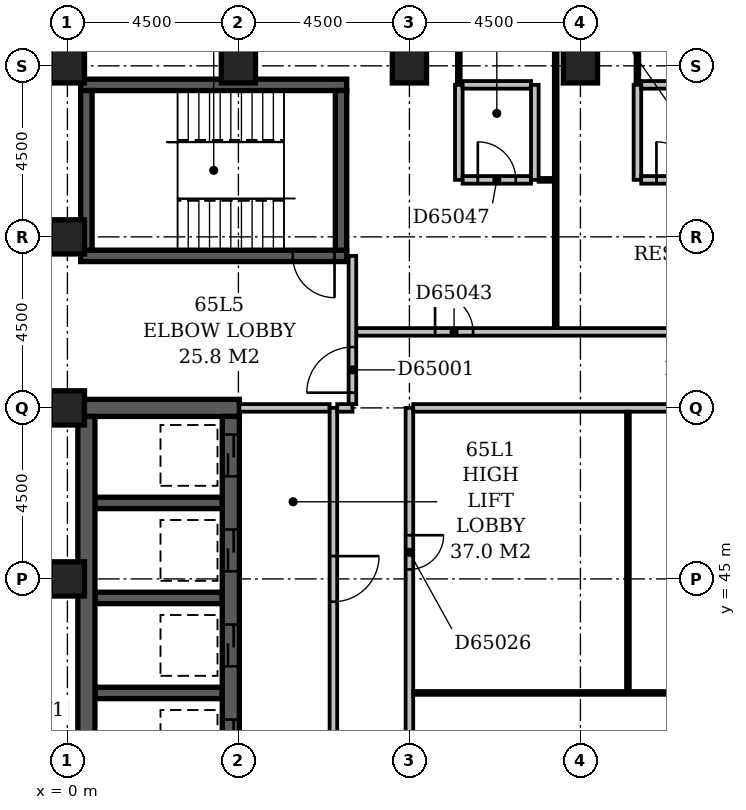
"""IFC4 building model, lengths in metres.
Left out: names, types, materials, properties, quantities, classifications, styles, units other than length and angle.
Written with IfcOpenShell. Run it as: python <this file> out.ifc"""

import sys

from ifc_helpers import new_model, si_unit, direction, frame, frame_2d, origin, origin_2d, place, context, subcontext, project, spatial, rectangle, extrude, element, fill, save


model = new_model("IFC4")
c1 = context("Model", 3, precision=1e-05, world=origin(), true_north=direction((0.0, 1.0)))
c2 = subcontext(c1, "Body", "Model", "MODEL_VIEW")
j1 = project(units=[si_unit("LENGTHUNIT", "METRE"), si_unit("PLANEANGLEUNIT", "RADIAN")], contexts=[c1])
p1 = place(None, origin())
s1 = spatial("IfcSite", under=j1, at=p1, CompositionType="ELEMENT")
p2 = place(p1, origin())
s2 = spatial("IfcBuilding", under=s1, at=p2, CompositionType="ELEMENT")
p3 = place(p2, frame((0.0, 0.0, 251.0)))
s3 = spatial("IfcBuildingStorey", under=s2, at=p3, CompositionType="ELEMENT", Elevation=251.0)
p4 = place(p3, frame((0.275, 49.5, -0.3), z_axis=(0.0, 0.0, 1.0), x_axis=(1.0, 0.0, 0.0)))
e1 = element("IfcWall", 1, at=p4, inside=s3, PredefinedType="SHEAR", context=c2, shape_type="SweptSolid", body=[
    extrude(rectangle(XDim=4.25, YDim=0.45, at=frame_2d((2.125, 0.0))), origin(), (0.0, 0.0, 1.0), 3.6),
])
p5 = place(p3, frame((0.35, 53.5, -0.3), z_axis=(0.0, 0.0, 1.0), x_axis=(1.0, 0.0, 0.0)))
e2 = element("IfcWall", 2, at=p5, inside=s3, PredefinedType="SHEAR", context=c2, shape_type="SweptSolid", body=[
    extrude(rectangle(XDim=7.0, YDim=0.3, at=frame_2d((3.5, 0.0))), origin(), (0.0, 0.0, 1.0), 3.6),
])
p6 = place(p5, frame((5.58, 0.0, 0.3)))
e3 = element("IfcOpeningElement", 3, at=p6, cuts=e2, PredefinedType="OPENING", context=c2, shape_type="SweptSolid", body=[
    extrude(rectangle(XDim=1.1, YDim=2.1, at=frame_2d((0.55, 1.05))), frame((0.0, 0.162, 0.0), z_axis=(0.0, -1.0, 0.0), x_axis=(1.0, 0.0, 0.0)), (0.0, 0.0, 1.0), 0.324),
])
p7 = place(p3, frame((0.35, 58.0, -0.3), z_axis=(0.0, 0.0, 1.0), x_axis=(1.0, 0.0, 0.0)))
e4 = element("IfcWall", 4, at=p7, inside=s3, PredefinedType="SHEAR", context=c2, shape_type="SweptSolid", body=[
    extrude(rectangle(XDim=7.0, YDim=0.3, at=frame_2d((3.5, 0.0))), origin(), (0.0, 0.0, 1.0), 3.6),
])
p8 = place(p3, frame((0.5, 27.15, -0.3), z_axis=(0.0, 0.0, 1.0), x_axis=(0.0, 1.0, 0.0)))
e5 = element("IfcWall", 5, at=p8, inside=s3, PredefinedType="SHEAR", context=c2, shape_type="SweptSolid", body=[
    extrude(rectangle(XDim=22.125, YDim=0.45, at=frame_2d((11.062, 0.0))), origin(), (0.0, 0.0, 1.0), 3.6),
])
p9 = place(p3, frame((0.5, 53.65, -0.3), z_axis=(0.0, 0.0, 1.0), x_axis=(0.0, 1.0, 0.0)))
e6 = element("IfcWall", 6, at=p9, inside=s3, PredefinedType="SHEAR", context=c2, shape_type="SweptSolid", body=[
    extrude(rectangle(XDim=4.2, YDim=0.3, at=frame_2d((2.1, 0.0))), origin(), (0.0, 0.0, 1.0), 3.6),
])
for number, where, z_axis, x_axis in (
    (7, (0.725, 42.0, -0.3), (0.0, 0.0, 1.0), (1.0, 0.0, 0.0)),
    (8, (0.725, 44.5, -0.3), (0.0, 0.0, 1.0), (1.0, 0.0, 0.0)),
    (9, (0.725, 47.0, -0.3), (0.0, 0.0, 1.0), (1.0, 0.0, 0.0)),
):
    element("IfcWall", number, at=place(p3, frame(where, z_axis=z_axis, x_axis=x_axis)), inside=s3, PredefinedType="SHEAR", context=c2, shape_type="SweptSolid", body=[
        extrude(rectangle(XDim=3.35, YDim=0.3, at=frame_2d((1.675, 0.0))), origin(), (0.0, 0.0, 1.0), 3.6),
    ])
p10 = place(p3, frame((4.3, 27.15, -0.3), z_axis=(0.0, 0.0, 1.0), x_axis=(0.0, 1.0, 0.0)))
e10 = element("IfcWall", 10, at=p10, inside=s3, PredefinedType="SHEAR", context=c2, shape_type="SweptSolid", body=[
    extrude(rectangle(XDim=22.125, YDim=0.45, at=frame_2d((11.062, 0.0))), origin(), (0.0, 0.0, 1.0), 3.6),
])
p11 = place(p10, frame((3.05, 0.0, 0.3)))
e11 = element("IfcOpeningElement", 11, at=p11, cuts=e10, PredefinedType="OPENING", context=c2, shape_type="SweptSolid", body=[
    extrude(rectangle(XDim=1.1, YDim=2.1, at=frame_2d((0.55, 1.05))), frame((0.0, 0.237, 0.0), z_axis=(0.0, -1.0, 0.0), x_axis=(1.0, 0.0, 0.0)), (0.0, 0.0, 1.0), 0.474),
])
p12 = place(p10, frame((0.55, 0.0, 0.3)))
e12 = element("IfcOpeningElement", 12, at=p12, cuts=e10, PredefinedType="OPENING", context=c2, shape_type="SweptSolid", body=[
    extrude(rectangle(XDim=1.1, YDim=2.1, at=frame_2d((0.55, 1.05))), frame((0.0, 0.237, 0.0), z_axis=(0.0, -1.0, 0.0), x_axis=(1.0, 0.0, 0.0)), (0.0, 0.0, 1.0), 0.474),
])
p13 = place(p10, frame((20.55, 0.0, 0.3)))
e13 = element("IfcOpeningElement", 13, at=p13, cuts=e10, PredefinedType="OPENING", context=c2, shape_type="SweptSolid", body=[
    extrude(rectangle(XDim=1.1, YDim=2.1, at=frame_2d((0.55, 1.05))), frame((0.0, 0.237, 0.0), z_axis=(0.0, -1.0, 0.0), x_axis=(1.0, 0.0, 0.0)), (0.0, 0.0, 1.0), 0.474),
])
p14 = place(p10, frame((18.05, 0.0, 0.3)))
e14 = element("IfcOpeningElement", 14, at=p14, cuts=e10, PredefinedType="OPENING", context=c2, shape_type="SweptSolid", body=[
    extrude(rectangle(XDim=1.1, YDim=2.1, at=frame_2d((0.55, 1.05))), frame((0.0, 0.237, 0.0), z_axis=(0.0, -1.0, 0.0), x_axis=(1.0, 0.0, 0.0)), (0.0, 0.0, 1.0), 0.474),
])
p15 = place(p10, frame((15.55, 0.0, 0.3)))
e15 = element("IfcOpeningElement", 15, at=p15, cuts=e10, PredefinedType="OPENING", context=c2, shape_type="SweptSolid", body=[
    extrude(rectangle(XDim=1.1, YDim=2.1, at=frame_2d((0.55, 1.05))), frame((0.0, 0.237, 0.0), z_axis=(0.0, -1.0, 0.0), x_axis=(1.0, 0.0, 0.0)), (0.0, 0.0, 1.0), 0.474),
])
p16 = place(p10, frame((13.05, 0.0, 0.3)))
e16 = element("IfcOpeningElement", 16, at=p16, cuts=e10, PredefinedType="OPENING", context=c2, shape_type="SweptSolid", body=[
    extrude(rectangle(XDim=1.1, YDim=2.1, at=frame_2d((0.55, 1.05))), frame((0.0, 0.237, 0.0), z_axis=(0.0, -1.0, 0.0), x_axis=(1.0, 0.0, 0.0)), (0.0, 0.0, 1.0), 0.474),
])
p17 = place(p10, frame((10.55, 0.0, 0.3)))
e17 = element("IfcOpeningElement", 17, at=p17, cuts=e10, PredefinedType="OPENING", context=c2, shape_type="SweptSolid", body=[
    extrude(rectangle(XDim=1.1, YDim=2.1, at=frame_2d((0.55, 1.05))), frame((0.0, 0.237, 0.0), z_axis=(0.0, -1.0, 0.0), x_axis=(1.0, 0.0, 0.0)), (0.0, 0.0, 1.0), 0.474),
])
p18 = place(p10, frame((8.05, 0.0, 0.3)))
e18 = element("IfcOpeningElement", 18, at=p18, cuts=e10, PredefinedType="OPENING", context=c2, shape_type="SweptSolid", body=[
    extrude(rectangle(XDim=1.1, YDim=2.1, at=frame_2d((0.55, 1.05))), frame((0.0, 0.237, 0.0), z_axis=(0.0, -1.0, 0.0), x_axis=(1.0, 0.0, 0.0)), (0.0, 0.0, 1.0), 0.474),
])
p19 = place(p10, frame((5.55, 0.0, 0.3)))
e19 = element("IfcOpeningElement", 19, at=p19, cuts=e10, PredefinedType="OPENING", context=c2, shape_type="SweptSolid", body=[
    extrude(rectangle(XDim=1.1, YDim=2.1, at=frame_2d((0.55, 1.05))), frame((0.0, 0.237, 0.0), z_axis=(0.0, -1.0, 0.0), x_axis=(1.0, 0.0, 0.0)), (0.0, 0.0, 1.0), 0.474),
])
p20 = place(p3, frame((7.2, 53.65, -0.3), z_axis=(0.0, 0.0, 1.0), x_axis=(0.0, 1.0, 0.0)))
e20 = element("IfcWall", 20, at=p20, inside=s3, PredefinedType="SHEAR", context=c2, shape_type="SweptSolid", body=[
    extrude(rectangle(XDim=4.2, YDim=0.3, at=frame_2d((2.1, 0.0))), origin(), (0.0, 0.0, 1.0), 3.6),
])
for number, where, z_axis, x_axis in (
    (21, (0.0, 45.0, -0.3), (0.0, 0.0, 1.0), (1.0, 0.0, 0.0)),
    (22, (0.0, 49.5, -0.3), (0.0, 0.0, 1.0), (1.0, 0.0, 0.0)),
    (23, (0.0, 54.0, -0.3), (0.0, 0.0, 1.0), (1.0, 0.0, 0.0)),
    (24, (0.0, 58.5, -0.3), (0.0, 0.0, 1.0), (1.0, 0.0, 0.0)),
    (25, (4.5, 58.5, -0.3), (0.0, 0.0, 1.0), (1.0, 0.0, 0.0)),
    (26, (9.0, 58.5, -0.3), (0.0, 0.0, 1.0), (1.0, 0.0, 0.0)),
    (27, (13.5, 58.5, -0.3), (0.0, 0.0, 1.0), (1.0, 0.0, 0.0)),
):
    element("IfcColumn", number, at=place(p3, frame(where, z_axis=z_axis, x_axis=x_axis)), inside=s3, PredefinedType="COLUMN", context=c2, shape_type="SweptSolid", body=[
        extrude(rectangle(XDim=0.9, YDim=0.9, at=origin_2d()), origin(), (0.0, 0.0, 1.0), 3.6),
    ])
p21 = place(p3, frame((7.0, 34.6, 0.0), z_axis=(0.0, 0.0, 1.0), x_axis=(0.0, 1.0, 0.0)))
e28 = element("IfcWall", 28, at=p21, inside=s3, PredefinedType="PARTITIONING", context=c2, shape_type="SweptSolid", body=[
    extrude(rectangle(XDim=14.9, YDim=0.2, at=frame_2d((7.45, 0.0))), origin(), (0.0, 0.0, 1.0), 3.3),
])
p22 = place(p21, frame((2.8, 0.0, 0.0)))
e29 = element("IfcOpeningElement", 29, at=p22, cuts=e28, PredefinedType="OPENING", context=c2, shape_type="SweptSolid", body=[
    extrude(rectangle(XDim=1.2, YDim=2.1, at=frame_2d((0.6, 1.05))), frame((0.0, 0.112, 0.0), z_axis=(0.0, -1.0, 0.0), x_axis=(1.0, 0.0, 0.0)), (0.0, 0.0, 1.0), 0.224),
])
p23 = place(p21, frame((9.8, 0.0, 0.0)))
e30 = element("IfcOpeningElement", 30, at=p23, cuts=e28, PredefinedType="OPENING", context=c2, shape_type="SweptSolid", body=[
    extrude(rectangle(XDim=1.2, YDim=2.1, at=frame_2d((0.6, 1.05))), frame((0.0, 0.112, 0.0), z_axis=(0.0, -1.0, 0.0), x_axis=(1.0, 0.0, 0.0)), (0.0, 0.0, 1.0), 0.224),
])
p24 = place(p3, frame((4.525, 49.5, 0.0), z_axis=(0.0, 0.0, 1.0), x_axis=(1.0, 0.0, 0.0)))
e31 = element("IfcWall", 31, at=p24, inside=s3, PredefinedType="PARTITIONING", context=c2, shape_type="SweptSolid", body=[
    extrude(rectangle(XDim=2.375, YDim=0.2, at=frame_2d((1.188, 0.0))), origin(), (0.0, 0.0, 1.0), 3.3),
])
p25 = place(p3, frame((7.1, 49.5, 0.0), z_axis=(0.0, 0.0, 1.0), x_axis=(1.0, 0.0, 0.0)))
e32 = element("IfcWall", 32, at=p25, inside=s3, PredefinedType="PARTITIONING", context=c2, shape_type="SweptSolid", body=[
    extrude(rectangle(XDim=0.4, YDim=0.2, at=frame_2d((0.2, 0.0))), origin(), (0.0, 0.0, 1.0), 3.3),
])
p26 = place(p3, frame((7.5, 49.6, 0.0), z_axis=(0.0, 0.0, 1.0), x_axis=(0.0, 1.0, 0.0)))
e33 = element("IfcWall", 33, at=p26, inside=s3, PredefinedType="PARTITIONING", context=c2, shape_type="SweptSolid", body=[
    extrude(rectangle(XDim=3.9, YDim=0.2, at=frame_2d((1.95, 0.0))), origin(), (0.0, 0.0, 1.0), 3.3),
])
p27 = place(p26, frame((0.3, 0.0, 0.0)))
e34 = element("IfcOpeningElement", 34, at=p27, cuts=e33, PredefinedType="OPENING", context=c2, shape_type="SweptSolid", body=[
    extrude(rectangle(XDim=1.2, YDim=2.1, at=frame_2d((0.6, 1.05))), frame((0.0, 0.112, 0.0), z_axis=(0.0, -1.0, 0.0), x_axis=(1.0, 0.0, 0.0)), (0.0, 0.0, 1.0), 0.224),
])
p28 = place(p3, frame((9.0, 38.0, 0.0), z_axis=(0.0, 0.0, 1.0), x_axis=(0.0, 1.0, 0.0)))
e35 = element("IfcWall", 35, at=p28, inside=s3, PredefinedType="PARTITIONING", context=c2, shape_type="SweptSolid", body=[
    extrude(rectangle(XDim=11.5, YDim=0.2, at=frame_2d((5.75, 0.0))), origin(), (0.0, 0.0, 1.0), 3.3),
])
p29 = place(p28, frame((1.5, 0.0, 0.0)))
e36 = element("IfcOpeningElement", 36, at=p29, cuts=e35, PredefinedType="OPENING", context=c2, shape_type="SweptSolid", body=[
    extrude(rectangle(XDim=0.9, YDim=2.1, at=frame_2d((0.45, 1.05))), frame((0.0, 0.112, 0.0), z_axis=(0.0, -1.0, 0.0), x_axis=(1.0, 0.0, 0.0)), (0.0, 0.0, 1.0), 0.224),
])
p30 = place(p28, frame((7.25, 0.0, 0.0)))
e37 = element("IfcOpeningElement", 37, at=p30, cuts=e35, PredefinedType="OPENING", context=c2, shape_type="SweptSolid", body=[
    extrude(rectangle(XDim=0.9, YDim=2.1, at=frame_2d((0.45, 1.05))), frame((0.0, 0.112, 0.0), z_axis=(0.0, -1.0, 0.0), x_axis=(1.0, 0.0, 0.0)), (0.0, 0.0, 1.0), 0.224),
])
p31 = place(p3, frame((9.1, 42.0, 0.0), z_axis=(0.0, 0.0, 1.0), x_axis=(1.0, 0.0, 0.0)))
e38 = element("IfcWall", 38, at=p31, inside=s3, PredefinedType="PARTITIONING", context=c2, shape_type="SweptSolid", body=[
    extrude(rectangle(XDim=11.3, YDim=0.1, at=frame_2d((5.65, 0.0))), origin(), (0.0, 0.0, 1.0), 3.3),
])
p32 = place(p3, frame((14.75, 42.05, 0.0), z_axis=(0.0, 0.0, 1.0), x_axis=(0.0, 1.0, 0.0)))
e39 = element("IfcWall", 39, at=p32, inside=s3, PredefinedType="PARTITIONING", context=c2, shape_type="SweptSolid", body=[
    extrude(rectangle(XDim=7.35, YDim=0.1, at=frame_2d((3.675, 0.0))), origin(), (0.0, 0.0, 1.0), 3.3),
])
p33 = place(p3, frame((9.1, 49.5, 0.0), z_axis=(0.0, 0.0, 1.0), x_axis=(1.0, 0.0, 0.0)))
e40 = element("IfcWall", 40, at=p33, inside=s3, PredefinedType="PARTITIONING", context=c2, shape_type="SweptSolid", body=[
    extrude(rectangle(XDim=11.3, YDim=0.2, at=frame_2d((5.65, 0.0))), origin(), (0.0, 0.0, 1.0), 3.3),
])
p34 = place(p33, frame((8.025, 0.0, 0.0)))
e41 = element("IfcOpeningElement", 41, at=p34, cuts=e40, PredefinedType="OPENING", context=c2, shape_type="SweptSolid", body=[
    extrude(rectangle(XDim=0.9, YDim=2.1, at=frame_2d((0.45, 1.05))), frame((0.0, 0.112, 0.0), z_axis=(0.0, -1.0, 0.0), x_axis=(1.0, 0.0, 0.0)), (0.0, 0.0, 1.0), 0.224),
])
p35 = place(p3, frame((7.6, 51.5, 0.0), z_axis=(0.0, 0.0, 1.0), x_axis=(1.0, 0.0, 0.0)))
e42 = element("IfcWall", 42, at=p35, inside=s3, PredefinedType="PARTITIONING", context=c2, shape_type="SweptSolid", body=[
    extrude(rectangle(XDim=15.3, YDim=0.2, at=frame_2d((7.65, 0.0))), origin(), (0.0, 0.0, 1.0), 3.3),
])
p36 = place(p35, frame((2.075, 0.0, 0.0)))
e43 = element("IfcOpeningElement", 43, at=p36, cuts=e42, PredefinedType="OPENING", context=c2, shape_type="SweptSolid", body=[
    extrude(rectangle(XDim=1.0, YDim=2.1, at=frame_2d((0.5, 1.05))), frame((0.0, 0.112, 0.0), z_axis=(0.0, -1.0, 0.0), x_axis=(1.0, 0.0, 0.0)), (0.0, 0.0, 1.0), 0.224),
])
p37 = place(p35, frame((9.875, 0.0, 0.0)))
e44 = element("IfcOpeningElement", 44, at=p37, cuts=e42, PredefinedType="OPENING", context=c2, shape_type="SweptSolid", body=[
    extrude(rectangle(XDim=0.9, YDim=2.1, at=frame_2d((0.45, 1.05))), frame((0.0, 0.112, 0.0), z_axis=(0.0, -1.0, 0.0), x_axis=(1.0, 0.0, 0.0)), (0.0, 0.0, 1.0), 0.224),
])
p38 = place(p3, frame((12.85, 51.6, 0.0), z_axis=(0.0, 0.0, 1.0), x_axis=(0.0, 1.0, 0.0)))
e45 = element("IfcWall", 45, at=p38, inside=s3, PredefinedType="PARTITIONING", context=c2, shape_type="SweptSolid", body=[
    extrude(rectangle(XDim=7.5, YDim=0.1, at=frame_2d((3.75, 0.0))), origin(), (0.0, 0.0, 1.0), 3.3),
])
p39 = place(p3, frame((10.3, 55.5, 0.0), z_axis=(0.0, 0.0, 1.0), x_axis=(0.0, 1.0, 0.0)))
e46 = element("IfcWall", 46, at=p39, inside=s3, PredefinedType="PARTITIONING", context=c2, shape_type="SweptSolid", body=[
    extrude(rectangle(XDim=2.5, YDim=0.2, at=frame_2d((1.25, 0.0))), origin(), (0.0, 0.0, 1.0), 3.3),
])
p40 = place(p3, frame((10.4, 55.5, 0.0), z_axis=(0.0, 0.0, 1.0), x_axis=(1.0, 0.0, 0.0)))
e47 = element("IfcWall", 47, at=p40, inside=s3, PredefinedType="PARTITIONING", context=c2, shape_type="SweptSolid", body=[
    extrude(rectangle(XDim=1.8, YDim=0.2, at=frame_2d((0.9, 0.0))), origin(), (0.0, 0.0, 1.0), 3.3),
])
p41 = place(p40, frame((0.4, 0.0, 0.0)))
e48 = element("IfcOpeningElement", 48, at=p41, cuts=e47, PredefinedType="OPENING", context=c2, shape_type="SweptSolid", body=[
    extrude(rectangle(XDim=1.0, YDim=2.1, at=frame_2d((0.5, 1.05))), frame((0.0, 0.112, 0.0), z_axis=(0.0, -1.0, 0.0), x_axis=(1.0, 0.0, 0.0)), (0.0, 0.0, 1.0), 0.224),
])
p42 = place(p3, frame((12.3, 55.5, 0.0), z_axis=(0.0, 0.0, 1.0), x_axis=(0.0, 1.0, 0.0)))
e49 = element("IfcWall", 49, at=p42, inside=s3, PredefinedType="PARTITIONING", context=c2, shape_type="SweptSolid", body=[
    extrude(rectangle(XDim=2.5, YDim=0.2, at=frame_2d((1.25, 0.0))), origin(), (0.0, 0.0, 1.0), 3.3),
])
p43 = place(p3, frame((12.4, 55.5, 0.0), z_axis=(0.0, 0.0, 1.0), x_axis=(1.0, 0.0, 0.0)))
e50 = element("IfcWall", 50, at=p43, inside=s3, PredefinedType="PARTITIONING", context=c2, shape_type="SweptSolid", body=[
    extrude(rectangle(XDim=0.4, YDim=0.1, at=frame_2d((0.2, 0.0))), origin(), (0.0, 0.0, 1.0), 3.3),
])
p44 = place(p3, frame((15.0, 55.5, 0.0), z_axis=(0.0, 0.0, 1.0), x_axis=(0.0, 1.0, 0.0)))
e51 = element("IfcWall", 51, at=p44, inside=s3, PredefinedType="PARTITIONING", context=c2, shape_type="SweptSolid", body=[
    extrude(rectangle(XDim=2.5, YDim=0.2, at=frame_2d((1.25, 0.0))), origin(), (0.0, 0.0, 1.0), 3.3),
])
p45 = place(p3, frame((15.1, 55.5, 0.0), z_axis=(0.0, 0.0, 1.0), x_axis=(1.0, 0.0, 0.0)))
e52 = element("IfcWall", 52, at=p45, inside=s3, PredefinedType="PARTITIONING", context=c2, shape_type="SweptSolid", body=[
    extrude(rectangle(XDim=1.8, YDim=0.2, at=frame_2d((0.9, 0.0))), origin(), (0.0, 0.0, 1.0), 3.3),
])
p46 = place(p45, frame((0.4, 0.0, 0.0)))
e53 = element("IfcOpeningElement", 53, at=p46, cuts=e52, PredefinedType="OPENING", context=c2, shape_type="SweptSolid", body=[
    extrude(rectangle(XDim=1.0, YDim=2.1, at=frame_2d((0.5, 1.05))), frame((0.0, 0.112, 0.0), z_axis=(0.0, -1.0, 0.0), x_axis=(1.0, 0.0, 0.0)), (0.0, 0.0, 1.0), 0.224),
])
p47 = place(p3, frame((10.3, 58.0, 0.0), z_axis=(0.0, 0.0, 1.0), x_axis=(0.0, 1.0, 0.0)))
e54 = element("IfcWall", 54, at=p47, inside=s3, PredefinedType="PARTITIONING", context=c2, shape_type="SweptSolid", body=[
    extrude(rectangle(XDim=1.1, YDim=0.1, at=frame_2d((0.55, 0.0))), origin(), (0.0, 0.0, 1.0), 3.3),
])
p48 = place(p3, frame((10.4, 58.0, 0.0), z_axis=(0.0, 0.0, 1.0), x_axis=(1.0, 0.0, 0.0)))
e55 = element("IfcWall", 55, at=p48, inside=s3, PredefinedType="PARTITIONING", context=c2, shape_type="SweptSolid", body=[
    extrude(rectangle(XDim=1.8, YDim=0.2, at=frame_2d((0.9, 0.0))), origin(), (0.0, 0.0, 1.0), 3.3),
])
p49 = place(p3, frame((15.0, 58.0, 0.0), z_axis=(0.0, 0.0, 1.0), x_axis=(0.0, 1.0, 0.0)))
e56 = element("IfcWall", 56, at=p49, inside=s3, PredefinedType="PARTITIONING", context=c2, shape_type="SweptSolid", body=[
    extrude(rectangle(XDim=1.1, YDim=0.1, at=frame_2d((0.55, 0.0))), origin(), (0.0, 0.0, 1.0), 3.3),
])
p50 = place(p3, frame((15.1, 58.0, 0.0), z_axis=(0.0, 0.0, 1.0), x_axis=(1.0, 0.0, 0.0)))
e57 = element("IfcWall", 57, at=p50, inside=s3, PredefinedType="PARTITIONING", context=c2, shape_type="SweptSolid", body=[
    extrude(rectangle(XDim=1.8, YDim=0.2, at=frame_2d((0.9, 0.0))), origin(), (0.0, 0.0, 1.0), 3.3),
])
p51 = place(p27, origin())
e58 = element("IfcDoor", 58, at=p51, inside=s3, OperationType="SINGLE_SWING_LEFT", PredefinedType="DOOR", context=c2, shape_type="SweptSolid", body=[
    extrude(rectangle(XDim=1.2, YDim=2.1, at=frame_2d((0.6, 1.05))), frame((0.0, 0.025, 0.0), z_axis=(0.0, -1.0, 0.0), x_axis=(1.0, 0.0, 0.0)), (0.0, 0.0, 1.0), 0.05),
])
fill(e34, e58)
p52 = place(p13, origin())
e59 = element("IfcDoor", 59, at=p52, inside=s3, OperationType="SLIDING_TO_LEFT", PredefinedType="DOOR", context=c2, shape_type="SweptSolid", body=[
    extrude(rectangle(XDim=1.1, YDim=2.1, at=frame_2d((0.55, 1.05))), frame((0.0, 0.025, 0.0), z_axis=(0.0, -1.0, 0.0), x_axis=(1.0, 0.0, 0.0)), (0.0, 0.0, 1.0), 0.05),
])
fill(e13, e59)
p53 = place(p14, origin())
e60 = element("IfcDoor", 60, at=p53, inside=s3, OperationType="SLIDING_TO_LEFT", PredefinedType="DOOR", context=c2, shape_type="SweptSolid", body=[
    extrude(rectangle(XDim=1.1, YDim=2.1, at=frame_2d((0.55, 1.05))), frame((0.0, 0.025, 0.0), z_axis=(0.0, -1.0, 0.0), x_axis=(1.0, 0.0, 0.0)), (0.0, 0.0, 1.0), 0.05),
])
fill(e14, e60)
p54 = place(p15, origin())
e61 = element("IfcDoor", 61, at=p54, inside=s3, OperationType="SLIDING_TO_LEFT", PredefinedType="DOOR", context=c2, shape_type="SweptSolid", body=[
    extrude(rectangle(XDim=1.1, YDim=2.1, at=frame_2d((0.55, 1.05))), frame((0.0, 0.025, 0.0), z_axis=(0.0, -1.0, 0.0), x_axis=(1.0, 0.0, 0.0)), (0.0, 0.0, 1.0), 0.05),
])
fill(e15, e61)
p55 = place(p16, origin())
e62 = element("IfcDoor", 62, at=p55, inside=s3, OperationType="SLIDING_TO_LEFT", PredefinedType="DOOR", context=c2, shape_type="SweptSolid", body=[
    extrude(rectangle(XDim=1.1, YDim=2.1, at=frame_2d((0.55, 1.05))), frame((0.0, 0.025, 0.0), z_axis=(0.0, -1.0, 0.0), x_axis=(1.0, 0.0, 0.0)), (0.0, 0.0, 1.0), 0.05),
])
fill(e16, e62)
p56 = place(p23, origin())
e63 = element("IfcDoor", 63, at=p56, inside=s3, OperationType="SINGLE_SWING_RIGHT", PredefinedType="DOOR", context=c2, shape_type="SweptSolid", body=[
    extrude(rectangle(XDim=1.2, YDim=2.1, at=frame_2d((0.6, 1.05))), frame((0.0, 0.025, 0.0), z_axis=(0.0, -1.0, 0.0), x_axis=(1.0, 0.0, 0.0)), (0.0, 0.0, 1.0), 0.05),
])
fill(e30, e63)
p57 = place(p6, origin())
e64 = element("IfcDoor", 64, at=p57, inside=s3, OperationType="SINGLE_SWING_RIGHT", PredefinedType="DOOR", context=c2, shape_type="SweptSolid", body=[
    extrude(rectangle(XDim=1.1, YDim=2.1, at=frame_2d((0.55, 1.05))), frame((0.0, 0.025, 0.0), z_axis=(0.0, -1.0, 0.0), x_axis=(1.0, 0.0, 0.0)), (0.0, 0.0, 1.0), 0.05),
])
fill(e3, e64)
p58 = place(p30, origin())
e65 = element("IfcDoor", 65, at=p58, inside=s3, OperationType="SINGLE_SWING_RIGHT", PredefinedType="DOOR", context=c2, shape_type="SweptSolid", body=[
    extrude(rectangle(XDim=0.9, YDim=2.1, at=frame_2d((0.45, 1.05))), frame((0.0, 0.025, 0.0), z_axis=(0.0, -1.0, 0.0), x_axis=(1.0, 0.0, 0.0)), (0.0, 0.0, 1.0), 0.05),
])
fill(e37, e65)
p59 = place(p36, origin())
e66 = element("IfcDoor", 66, at=p59, inside=s3, OperationType="SINGLE_SWING_LEFT", PredefinedType="DOOR", context=c2, shape_type="SweptSolid", body=[
    extrude(rectangle(XDim=1.0, YDim=2.1, at=frame_2d((0.5, 1.05))), frame((0.0, 0.025, 0.0), z_axis=(0.0, -1.0, 0.0), x_axis=(1.0, 0.0, 0.0)), (0.0, 0.0, 1.0), 0.05),
])
fill(e43, e66)
p60 = place(p41, origin())
e67 = element("IfcDoor", 67, at=p60, inside=s3, OperationType="SINGLE_SWING_LEFT", PredefinedType="DOOR", context=c2, shape_type="SweptSolid", body=[
    extrude(rectangle(XDim=1.0, YDim=2.1, at=frame_2d((0.5, 1.05))), frame((0.0, 0.025, 0.0), z_axis=(0.0, -1.0, 0.0), x_axis=(1.0, 0.0, 0.0)), (0.0, 0.0, 1.0), 0.05),
])
fill(e48, e67)
p61 = place(p46, origin())
e68 = element("IfcDoor", 68, at=p61, inside=s3, OperationType="SINGLE_SWING_LEFT", PredefinedType="DOOR", context=c2, shape_type="SweptSolid", body=[
    extrude(rectangle(XDim=1.0, YDim=2.1, at=frame_2d((0.5, 1.05))), frame((0.0, 0.025, 0.0), z_axis=(0.0, -1.0, 0.0), x_axis=(1.0, 0.0, 0.0)), (0.0, 0.0, 1.0), 0.05),
])
fill(e53, e68)
save(model, sys.argv[1])
